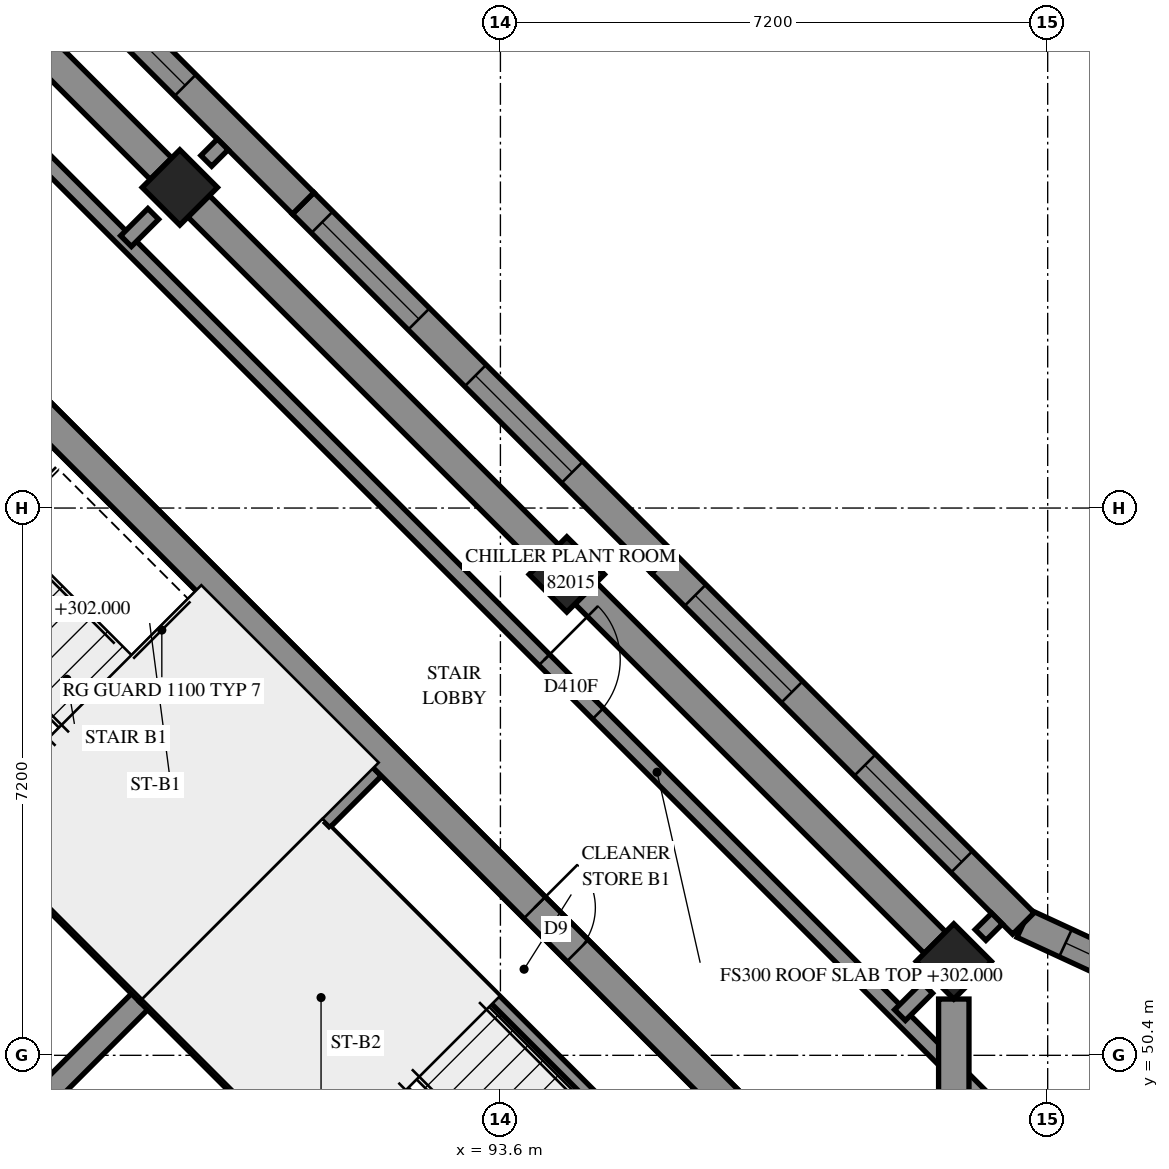
"""IFC4 building model, lengths in metres.
Left out: names, types, materials, properties, quantities, classifications, styles, units other than length and angle.
Written with IfcOpenShell. Run it as: python <this file> out.ifc"""

import sys

from ifc_helpers import new_model, si_unit, direction, frame, frame_2d, origin, origin_2d, place, context, subcontext, project, spatial, polyline, rectangle, outline, extrude, element, fill, save


model = new_model("IFC4")
c1 = context("Model", 3, precision=1e-05, world=origin(), true_north=direction((0.0, 1.0)))
c2 = subcontext(c1, "Body", "Model", "MODEL_VIEW")
j1 = project(units=[si_unit("LENGTHUNIT", "METRE"), si_unit("PLANEANGLEUNIT", "RADIAN")], contexts=[c1])
p1 = place(None, origin())
s1 = spatial("IfcSite", under=j1, at=p1, CompositionType="ELEMENT")
p2 = place(p1, origin())
s2 = spatial("IfcBuilding", under=s1, at=p2, CompositionType="ELEMENT")
p3 = place(p2, frame((0.0, 0.0, 302.0)))
s3 = spatial("IfcBuildingStorey", under=s2, at=p3, CompositionType="ELEMENT", Elevation=302.0)
for number, where, z_axis, x_axis in (
    (1, (89.382, 61.818, 0.0), (0.0, 0.0, 1.0), (0.707, -0.707, 0.0)),
    (2, (94.474, 56.727, 0.0), (0.0, 0.0, 1.0), (0.707, -0.707, 0.0)),
    (3, (99.565, 51.635, 0.0), (0.0, 0.0, 1.0), (0.707, -0.707, 0.0)),
):
    element("IfcColumn", number, at=place(p3, frame(where, z_axis=z_axis, x_axis=x_axis)), inside=s3, PredefinedType="COLUMN", context=c2, shape_type="SweptSolid", body=[
        extrude(rectangle(XDim=0.7, YDim=0.7, at=origin_2d()), origin(), (0.0, 0.0, 1.0), 3.5),
    ])
p4 = place(p3, frame((86.695, 59.696, -0.3), z_axis=(0.0, 0.0, 1.0), x_axis=(0.7071100706, -0.7071034917, 0.0)))
e4 = element("IfcWall", 4, at=p4, inside=s3, PredefinedType="SHEAR", context=c2, shape_type="SweptSolid", body=[
    extrude(outline(polyline([(0.0, 0.0), (15.2, 0.0), (15.2, 3.1), (0.0, 3.1), (0.0, 0.0)])), frame((0.0, 0.2, 0.0), z_axis=(0.0, -1.0, 0.0), x_axis=(1.0, 0.0, 0.0)), (0.0, 0.0, 1.0), 0.4),
])
p5 = place(p4, frame((10.4, 0.0, 0.3)))
e5 = element("IfcOpeningElement", 5, at=p5, cuts=e4, PredefinedType="OPENING", context=c2, shape_type="SweptSolid", body=[
    extrude(rectangle(XDim=0.8, YDim=2.1, at=frame_2d((0.4, 1.05))), frame((0.0, 0.21, 0.0), z_axis=(0.0, -1.0, 0.0), x_axis=(1.0, 0.0, 0.0)), (0.0, 0.0, 1.0), 0.42),
])
p6 = place(p3, frame((86.625, 48.878, 0.0), z_axis=(0.0, 0.0, 1.0), x_axis=(0.7071067812, 0.7071067812, 0.0)))
e6 = element("IfcWall", 6, at=p6, inside=s3, PredefinedType="SOLIDWALL", context=c2, shape_type="SweptSolid", body=[
    extrude(outline(polyline([(0.0, 0.0), (3.3, 0.0), (3.3, 3.5), (0.0, 3.5), (0.0, 0.0)])), frame((0.0, 0.15, 0.0), z_axis=(0.0, -1.0, 0.0), x_axis=(1.0, 0.0, 0.0)), (0.0, 0.0, 1.0), 0.3),
])
p7 = place(p3, frame((78.988, 51.423, 0.0), z_axis=(0.0, 0.0, 1.0), x_axis=(0.7071067812, -0.7071067812, 0.0)))
e7 = element("IfcWall", 7, at=p7, inside=s3, PredefinedType="SOLIDWALL", context=c2, shape_type="SweptSolid", body=[
    extrude(outline(polyline([(0.0, 0.0), (14.4, 0.0), (14.4, 3.5), (0.0, 3.5), (0.0, 0.0)])), frame((0.0, 0.15, 0.0), z_axis=(0.0, -1.0, 0.0), x_axis=(1.0, 0.0, 0.0)), (0.0, 0.0, 1.0), 0.3),
])
p8 = place(p3, frame((81.534, 53.969, 0.0), z_axis=(0.0, 0.0, 1.0), x_axis=(0.707103309, -0.7071102534, 0.0)))
e8 = element("IfcWall", 8, at=p8, inside=s3, PredefinedType="SOLIDWALL", context=c2, shape_type="SweptSolid", body=[
    extrude(outline(polyline([(0.0, 0.0), (14.4, 0.0), (14.4, 3.5), (0.0, 3.5), (0.0, 0.0)])), frame((0.0, 0.15, 0.0), z_axis=(0.0, -1.0, 0.0), x_axis=(1.0, 0.0, 0.0)), (0.0, 0.0, 1.0), 0.3),
])
p9 = place(p8, frame((12.05, 0.0, 0.0)))
e9 = element("IfcOpeningElement", 9, at=p9, cuts=e8, PredefinedType="OPENING", context=c2, shape_type="SweptSolid", body=[
    extrude(rectangle(XDim=1.1, YDim=2.1, at=frame_2d((0.55, 1.05))), frame((0.0, 0.16, 0.0), z_axis=(0.0, -1.0, 0.0), x_axis=(1.0, 0.0, 0.0)), (0.0, 0.0, 1.0), 0.32),
])
for number, where, z_axis, x_axis in (
    (10, (83.867, 56.302, 0.0), (0.0, 0.0, 1.0), (0.707, -0.707, 0.0)),
    (11, (88.958, 51.211, 0.0), (0.0, 0.0, 1.0), (0.707, -0.707, 0.0)),
):
    element("IfcWall", number, at=place(p3, frame(where, z_axis=z_axis, x_axis=x_axis)), inside=s3, PredefinedType="SOLIDWALL", context=c2, shape_type="SweptSolid", body=[
        extrude(outline(polyline([(0.0, 0.0), (7.2, 0.0), (7.2, 3.5), (0.0, 3.5), (0.0, 0.0)])), frame((0.0, 0.15, 0.0), z_axis=(0.0, -1.0, 0.0), x_axis=(1.0, 0.0, 0.0)), (0.0, 0.0, 1.0), 0.3),
    ])
p10 = place(p3, frame((88.958, 51.211, 0.0), z_axis=(0.0, 0.0, 1.0), x_axis=(0.7071067812, 0.7071067812, 0.0)))
e12 = element("IfcWall", 12, at=p10, inside=s3, PredefinedType="SOLIDWALL", context=c2, shape_type="SweptSolid", body=[
    extrude(outline(polyline([(0.0, 0.0), (4.2, 0.0), (4.2, 3.5), (0.0, 3.5), (0.0, 0.0)])), frame((0.0, 0.15, 0.0), z_axis=(0.0, -1.0, 0.0), x_axis=(1.0, 0.0, 0.0)), (0.0, 0.0, 1.0), 0.3),
])
p11 = place(p3, frame((99.282, 46.544, 0.0), z_axis=(0.0, 0.0, 1.0), x_axis=(0.7071067812, 0.7071067812, 0.0)))
e13 = element("IfcWall", 13, at=p11, inside=s3, PredefinedType="SOLIDWALL", context=c2, shape_type="SweptSolid", body=[
    extrude(outline(polyline([(0.2, -0.2), (6.23, -0.2), (5.657, 0.2), (-0.2, 0.2), (0.2, -0.2)])), origin(), (0.0, 0.0, 1.0), 3.5),
])
p12 = place(p11, frame((0.85, 0.0, 0.7)))
e14 = element("IfcOpeningElement", 14, at=p12, cuts=e13, PredefinedType="OPENING", context=c2, shape_type="SweptSolid", body=[
    extrude(rectangle(XDim=1.8, YDim=2.2, at=frame_2d((0.9, 1.1))), frame((0.0, 0.21, 0.0), z_axis=(0.0, -1.0, 0.0), x_axis=(1.0, 0.0, 0.0)), (0.0, 0.0, 1.0), 0.42),
])
p13 = place(p3, frame((103.484, 50.747, 0.0), z_axis=(0.0, 0.0, 1.0), x_axis=(-0.9078558767, 0.4192823716, 0.0)))
e15 = element("IfcWall", 15, at=p13, inside=s3, PredefinedType="SOLIDWALL", context=c2, shape_type="SweptSolid", body=[
    extrude(outline(polyline([(-0.287, -0.2), (3.273, -0.2), (3.345, 0.2), (0.287, 0.2), (-0.287, -0.2)])), origin(), (0.0, 0.0, 1.0), 3.5),
])
p14 = place(p13, frame((0.898, 0.0, 0.7)))
e16 = element("IfcOpeningElement", 16, at=p14, cuts=e15, PredefinedType="OPENING", context=c2, shape_type="SweptSolid", body=[
    extrude(rectangle(XDim=1.8, YDim=2.2, at=frame_2d((0.9, 1.1))), frame((0.0, 0.21, 0.0), z_axis=(0.0, -1.0, 0.0), x_axis=(1.0, 0.0, 0.0)), (0.0, 0.0, 1.0), 0.42),
])
p15 = place(p3, frame((100.48, 52.134, 0.0), z_axis=(0.0, 0.0, 1.0), x_axis=(-0.7071067812, 0.7071067812, 0.0)))
e17 = element("IfcWall", 17, at=p15, inside=s3, PredefinedType="SOLIDWALL", context=c2, shape_type="SweptSolid", body=[
    extrude(outline(polyline([(0.036, -0.2), (6.718, -0.2), (6.718, 0.2), (-0.036, 0.2), (0.036, -0.2)])), origin(), (0.0, 0.0, 1.0), 3.5),
])
p16 = place(p15, frame((1.147, 0.0, 0.7)))
e18 = element("IfcOpeningElement", 18, at=p16, cuts=e17, PredefinedType="OPENING", context=c2, shape_type="SweptSolid", body=[
    extrude(rectangle(XDim=1.8, YDim=2.2, at=frame_2d((0.9, 1.1))), frame((0.0, 0.21, 0.0), z_axis=(0.0, -1.0, 0.0), x_axis=(1.0, 0.0, 0.0)), (0.0, 0.0, 1.0), 0.42),
])
p17 = place(p15, frame((4.306, 0.0, 0.7)))
e19 = element("IfcOpeningElement", 19, at=p17, cuts=e17, PredefinedType="OPENING", context=c2, shape_type="SweptSolid", body=[
    extrude(rectangle(XDim=1.8, YDim=2.2, at=frame_2d((0.9, 1.1))), frame((0.0, 0.21, 0.0), z_axis=(0.0, -1.0, 0.0), x_axis=(1.0, 0.0, 0.0)), (0.0, 0.0, 1.0), 0.42),
])
p18 = place(p3, frame((95.73, 56.884, 0.0), z_axis=(0.0, 0.0, 1.0), x_axis=(-0.7071067812, 0.7071067812, 0.0)))
e20 = element("IfcWall", 20, at=p18, inside=s3, PredefinedType="SOLIDWALL", context=c2, shape_type="SweptSolid", body=[
    extrude(outline(polyline([(0.0, -0.2), (6.682, -0.2), (6.682, 0.2), (0.0, 0.2), (0.0, -0.2)])), origin(), (0.0, 0.0, 1.0), 3.5),
])
p19 = place(p18, frame((1.677, 0.0, 0.7)))
e21 = element("IfcOpeningElement", 21, at=p19, cuts=e20, PredefinedType="OPENING", context=c2, shape_type="SweptSolid", body=[
    extrude(rectangle(XDim=1.8, YDim=2.2, at=frame_2d((0.9, 1.1))), frame((0.0, 0.21, 0.0), z_axis=(0.0, -1.0, 0.0), x_axis=(1.0, 0.0, 0.0)), (0.0, 0.0, 1.0), 0.42),
])
p20 = place(p18, frame((4.529, 0.0, 0.7)))
e22 = element("IfcOpeningElement", 22, at=p20, cuts=e20, PredefinedType="OPENING", context=c2, shape_type="SweptSolid", body=[
    extrude(rectangle(XDim=1.8, YDim=2.2, at=frame_2d((0.9, 1.1))), frame((0.0, 0.21, 0.0), z_axis=(0.0, -1.0, 0.0), x_axis=(1.0, 0.0, 0.0)), (0.0, 0.0, 1.0), 0.42),
])
p21 = place(p3, frame((91.005, 61.609, 0.0), z_axis=(0.0, 0.0, 1.0), x_axis=(-0.7071142638, 0.7070992985, 0.0)))
e23 = element("IfcWall", 23, at=p21, inside=s3, PredefinedType="SOLIDWALL", context=c2, shape_type="SweptSolid", body=[
    extrude(outline(polyline([(0.0, -0.2), (6.682, -0.2), (6.682, 0.2), (0.0, 0.2), (0.0, -0.2)])), origin(), (0.0, 0.0, 1.0), 3.5),
])
p22 = place(p21, frame((2.195, 0.0, 0.7)))
e24 = element("IfcOpeningElement", 24, at=p22, cuts=e23, PredefinedType="OPENING", context=c2, shape_type="SweptSolid", body=[
    extrude(rectangle(XDim=1.8, YDim=2.2, at=frame_2d((0.9, 1.1))), frame((0.0, 0.21, 0.0), z_axis=(0.0, -1.0, 0.0), x_axis=(1.0, 0.0, 0.0)), (0.0, 0.0, 1.0), 0.42),
])
p23 = place(p3, frame((72.821, 56.6, 0.0), z_axis=(0.0, 0.0, 1.0), x_axis=(0.7071067812, -0.7071067812, 0.0)))
e25 = element("IfcWall", 25, at=p23, inside=s3, PredefinedType="SOLIDWALL", context=c2, shape_type="SweptSolid", body=[
    extrude(outline(polyline([(0.083, -0.2), (30.821, -0.2), (30.421, 0.2), (-0.083, 0.2), (0.083, -0.2)])), origin(), (0.0, 0.0, 1.0), 3.5),
])
p24 = place(p23, frame((2.421, 0.0, 0.7)))
e26 = element("IfcOpeningElement", 26, at=p24, cuts=e25, PredefinedType="OPENING", context=c2, shape_type="SweptSolid", body=[
    extrude(rectangle(XDim=1.8, YDim=2.2, at=frame_2d((0.9, 1.1))), frame((0.0, 0.21, 0.0), z_axis=(0.0, -1.0, 0.0), x_axis=(1.0, 0.0, 0.0)), (0.0, 0.0, 1.0), 0.42),
])
p25 = place(p23, frame((5.521, 0.0, 0.7)))
e27 = element("IfcOpeningElement", 27, at=p25, cuts=e25, PredefinedType="OPENING", context=c2, shape_type="SweptSolid", body=[
    extrude(rectangle(XDim=1.8, YDim=2.2, at=frame_2d((0.9, 1.1))), frame((0.0, 0.21, 0.0), z_axis=(0.0, -1.0, 0.0), x_axis=(1.0, 0.0, 0.0)), (0.0, 0.0, 1.0), 0.42),
])
p26 = place(p23, frame((8.921, 0.0, 0.7)))
e28 = element("IfcOpeningElement", 28, at=p26, cuts=e25, PredefinedType="OPENING", context=c2, shape_type="SweptSolid", body=[
    extrude(rectangle(XDim=1.8, YDim=2.2, at=frame_2d((0.9, 1.1))), frame((0.0, 0.21, 0.0), z_axis=(0.0, -1.0, 0.0), x_axis=(1.0, 0.0, 0.0)), (0.0, 0.0, 1.0), 0.42),
])
p27 = place(p23, frame((12.521, 0.0, 0.7)))
e29 = element("IfcOpeningElement", 29, at=p27, cuts=e25, PredefinedType="OPENING", context=c2, shape_type="SweptSolid", body=[
    extrude(rectangle(XDim=1.8, YDim=2.2, at=frame_2d((0.9, 1.1))), frame((0.0, 0.21, 0.0), z_axis=(0.0, -1.0, 0.0), x_axis=(1.0, 0.0, 0.0)), (0.0, 0.0, 1.0), 0.42),
])
p28 = place(p23, frame((16.121, 0.0, 0.7)))
e30 = element("IfcOpeningElement", 30, at=p28, cuts=e25, PredefinedType="OPENING", context=c2, shape_type="SweptSolid", body=[
    extrude(rectangle(XDim=1.8, YDim=2.2, at=frame_2d((0.9, 1.1))), frame((0.0, 0.21, 0.0), z_axis=(0.0, -1.0, 0.0), x_axis=(1.0, 0.0, 0.0)), (0.0, 0.0, 1.0), 0.42),
])
p29 = place(p23, frame((19.721, 0.0, 0.7)))
e31 = element("IfcOpeningElement", 31, at=p29, cuts=e25, PredefinedType="OPENING", context=c2, shape_type="SweptSolid", body=[
    extrude(rectangle(XDim=1.8, YDim=2.2, at=frame_2d((0.9, 1.1))), frame((0.0, 0.21, 0.0), z_axis=(0.0, -1.0, 0.0), x_axis=(1.0, 0.0, 0.0)), (0.0, 0.0, 1.0), 0.42),
])
p30 = place(p23, frame((23.071, 0.0, 0.7)))
e32 = element("IfcOpeningElement", 32, at=p30, cuts=e25, PredefinedType="OPENING", context=c2, shape_type="SweptSolid", body=[
    extrude(rectangle(XDim=1.8, YDim=2.2, at=frame_2d((0.9, 1.1))), frame((0.0, 0.21, 0.0), z_axis=(0.0, -1.0, 0.0), x_axis=(1.0, 0.0, 0.0)), (0.0, 0.0, 1.0), 0.42),
])
p31 = place(p23, frame((26.921, 0.0, 0.7)))
e33 = element("IfcOpeningElement", 33, at=p31, cuts=e25, PredefinedType="OPENING", context=c2, shape_type="SweptSolid", body=[
    extrude(rectangle(XDim=1.8, YDim=2.2, at=frame_2d((0.9, 1.1))), frame((0.0, 0.21, 0.0), z_axis=(0.0, -1.0, 0.0), x_axis=(1.0, 0.0, 0.0)), (0.0, 0.0, 1.0), 0.42),
])
p32 = place(p3, frame((91.313, 53.354, 0.0), z_axis=(0.0, 0.0, 1.0), x_axis=(0.7071147811, -0.7070987812, 0.0)))
e34 = element("IfcWall", 34, at=p32, inside=s3, PredefinedType="PARTITIONING", context=c2, shape_type="SweptSolid", body=[
    extrude(outline(polyline([(0.0, 0.0), (6.25, 0.0), (6.25, 3.5), (0.0, 3.5), (0.0, 0.0)])), frame((0.0, 0.075, 0.0), z_axis=(0.0, -1.0, 0.0), x_axis=(1.0, 0.0, 0.0)), (0.0, 0.0, 1.0), 0.15),
])
p33 = place(p3, frame((86.833, 62.947, 0.0), z_axis=(0.0, 0.0, 1.0), x_axis=(0.7071067812, -0.7071067812, 0.0)))
e35 = element("IfcWall", 35, at=p33, inside=s3, PredefinedType="PARTITIONING", context=c2, shape_type="SweptSolid", body=[
    extrude(rectangle(XDim=19.601, YDim=0.2, at=frame_2d((9.8, 0.0))), origin(), (0.0, 0.0, 1.0), 3.5),
])
p34 = place(p33, frame((10.386, 0.0, 0.0)))
e36 = element("IfcOpeningElement", 36, at=p34, cuts=e35, PredefinedType="OPENING", context=c2, shape_type="SweptSolid", body=[
    extrude(rectangle(XDim=1.0, YDim=2.1, at=frame_2d((0.5, 1.05))), frame((0.0, 0.11, 0.0), z_axis=(0.0, -1.0, 0.0), x_axis=(1.0, 0.0, 0.0)), (0.0, 0.0, 1.0), 0.22),
])
for number, where, z_axis, x_axis in (
    (37, (88.674, 61.111, 0.0), (0.0, 0.0, 1.0), (0.707, 0.707, 0.0)),
    (38, (98.857, 50.929, 0.0), (0.0, 0.0, 1.0), (0.707, 0.707, 0.0)),
):
    element("IfcWall", number, at=place(p3, frame(where, z_axis=z_axis, x_axis=x_axis)), inside=s3, PredefinedType="PARTITIONING", context=c2, shape_type="SweptSolid", body=[
        extrude(rectangle(XDim=0.506, YDim=0.2, at=frame_2d((0.253, 0.0))), origin(), (0.0, 0.0, 1.0), 3.5),
    ])
p35 = place(p3, frame((89.731, 62.167, 0.0), z_axis=(0.0, 0.0, 1.0), x_axis=(0.7071067812, 0.7071067812, 0.0)))
e39 = element("IfcWall", 39, at=p35, inside=s3, PredefinedType="PARTITIONING", context=c2, shape_type="SweptSolid", body=[
    extrude(outline(polyline([(0.0, -0.1), (0.306, -0.1), (0.306, 0.1), (0.0, 0.1), (0.0, -0.1)])), origin(), (0.0, 0.0, 1.0), 3.5),
])
p36 = place(p3, frame((99.917, 51.983, 0.0), z_axis=(0.0, 0.0, 1.0), x_axis=(0.7087439748, 0.7054657881, 0.0)))
e40 = element("IfcWall", 40, at=p36, inside=s3, PredefinedType="PARTITIONING", context=c2, shape_type="SweptSolid", body=[
    extrude(outline(polyline([(0.0, -0.1), (0.305, -0.1), (0.305, 0.1), (0.0, 0.1), (0.0, -0.1)])), origin(), (0.0, 0.0, 1.0), 3.5),
])
p37 = place(p14, origin())
e41 = element("IfcWindow", 41, at=p37, inside=s3, PartitioningType="SINGLE_PANEL", PredefinedType="WINDOW", context=c2, shape_type="SweptSolid", body=[
    extrude(rectangle(XDim=1.8, YDim=2.2, at=frame_2d((0.9, 1.1))), frame((0.0, 0.08, 0.0), z_axis=(0.0, -1.0, 0.0), x_axis=(1.0, 0.0, 0.0)), (0.0, 0.0, 1.0), 0.06),
])
fill(e16, e41)
p38 = place(p16, origin())
e42 = element("IfcWindow", 42, at=p38, inside=s3, PartitioningType="SINGLE_PANEL", PredefinedType="WINDOW", context=c2, shape_type="SweptSolid", body=[
    extrude(rectangle(XDim=1.8, YDim=2.2, at=frame_2d((0.9, 1.1))), frame((0.0, 0.08, 0.0), z_axis=(0.0, -1.0, 0.0), x_axis=(1.0, 0.0, 0.0)), (0.0, 0.0, 1.0), 0.06),
])
fill(e18, e42)
p39 = place(p17, origin())
e43 = element("IfcWindow", 43, at=p39, inside=s3, PartitioningType="SINGLE_PANEL", PredefinedType="WINDOW", context=c2, shape_type="SweptSolid", body=[
    extrude(rectangle(XDim=1.8, YDim=2.2, at=frame_2d((0.9, 1.1))), frame((0.0, 0.08, 0.0), z_axis=(0.0, -1.0, 0.0), x_axis=(1.0, 0.0, 0.0)), (0.0, 0.0, 1.0), 0.06),
])
fill(e19, e43)
p40 = place(p19, origin())
e44 = element("IfcWindow", 44, at=p40, inside=s3, PartitioningType="SINGLE_PANEL", PredefinedType="WINDOW", context=c2, shape_type="SweptSolid", body=[
    extrude(rectangle(XDim=1.8, YDim=2.2, at=frame_2d((0.9, 1.1))), frame((0.0, 0.08, 0.0), z_axis=(0.0, -1.0, 0.0), x_axis=(1.0, 0.0, 0.0)), (0.0, 0.0, 1.0), 0.06),
])
fill(e21, e44)
p41 = place(p20, origin())
e45 = element("IfcWindow", 45, at=p41, inside=s3, PartitioningType="SINGLE_PANEL", PredefinedType="WINDOW", context=c2, shape_type="SweptSolid", body=[
    extrude(rectangle(XDim=1.8, YDim=2.2, at=frame_2d((0.9, 1.1))), frame((0.0, 0.08, 0.0), z_axis=(0.0, -1.0, 0.0), x_axis=(1.0, 0.0, 0.0)), (0.0, 0.0, 1.0), 0.06),
])
fill(e22, e45)
p42 = place(p22, origin())
e46 = element("IfcWindow", 46, at=p42, inside=s3, PartitioningType="SINGLE_PANEL", PredefinedType="WINDOW", context=c2, shape_type="SweptSolid", body=[
    extrude(rectangle(XDim=1.8, YDim=2.2, at=frame_2d((0.9, 1.1))), frame((0.0, 0.08, 0.0), z_axis=(0.0, -1.0, 0.0), x_axis=(1.0, 0.0, 0.0)), (0.0, 0.0, 1.0), 0.06),
])
fill(e24, e46)
p43 = place(p5, origin())
e47 = element("IfcDoor", 47, at=p43, inside=s3, OperationType="SINGLE_SWING_RIGHT", PredefinedType="DOOR", context=c2, shape_type="SweptSolid", body=[
    extrude(rectangle(XDim=0.8, YDim=2.1, at=frame_2d((0.4, 1.05))), frame((0.0, 0.025, 0.0), z_axis=(0.0, -1.0, 0.0), x_axis=(1.0, 0.0, 0.0)), (0.0, 0.0, 1.0), 0.05),
])
fill(e5, e47)
p44 = place(p34, origin())
e48 = element("IfcDoor", 48, at=p44, inside=s3, OperationType="SINGLE_SWING_LEFT", PredefinedType="DOOR", context=c2, shape_type="SweptSolid", body=[
    extrude(rectangle(XDim=1.0, YDim=2.1, at=frame_2d((0.5, 1.05))), frame((0.0, 0.025, 0.0), z_axis=(0.0, -1.0, 0.0), x_axis=(1.0, 0.0, 0.0)), (0.0, 0.0, 1.0), 0.05),
])
fill(e36, e48)
save(model, sys.argv[1])
